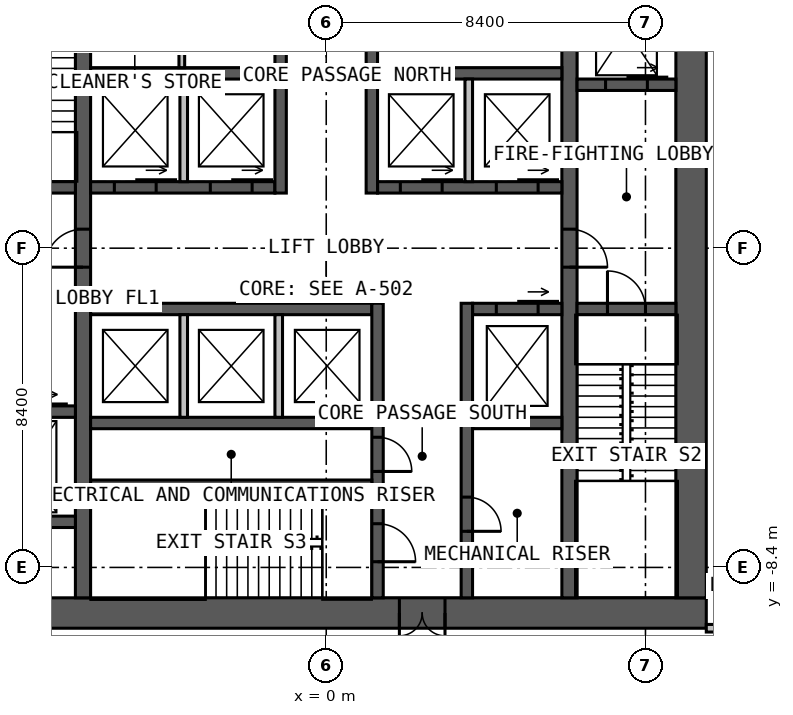
"""IFC4 building model, lengths in metres.
Left out: names, types, materials, properties, quantities, classifications, styles, units other than length and angle.
Written with IfcOpenShell. Run it as: python <this file> out.ifc"""

import sys

from ifc_helpers import new_model, si_unit, direction, frame, frame_2d, origin, place, context, subcontext, project, spatial, rectangle, extrude, element, fill, save


model = new_model("IFC4")
c1 = context("Model", 3, precision=1e-05, world=origin(), true_north=direction((0.0, 1.0)))
c2 = subcontext(c1, "Body", "Model", "MODEL_VIEW")
j1 = project(units=[si_unit("LENGTHUNIT", "METRE"), si_unit("PLANEANGLEUNIT", "RADIAN")], contexts=[c1])
p1 = place(None, origin())
s1 = spatial("IfcSite", under=j1, at=p1, CompositionType="ELEMENT")
p2 = place(p1, origin())
s2 = spatial("IfcBuilding", under=s1, at=p2, CompositionType="ELEMENT")
p3 = place(p2, frame((0.0, 0.0, 21.0)))
s3 = spatial("IfcBuildingStorey", under=s2, at=p3, CompositionType="ELEMENT", Elevation=21.0)
p4 = place(p3, frame((10.0, -9.6, 0.0), z_axis=(0.0, 0.0, 1.0), x_axis=(-1.0, 0.0, 0.0)))
e1 = element("IfcWall", 1, at=p4, inside=s3, PredefinedType="SOLIDWALL", context=c2, shape_type="SweptSolid", body=[
    extrude(rectangle(XDim=20.0, YDim=0.8, at=frame_2d((10.0, 0.0))), origin(), (0.0, 0.0, 1.0), 4.0),
])
p5 = place(p4, frame((6.875, 0.0, 0.0)))
e2 = element("IfcOpeningElement", 2, at=p5, cuts=e1, PredefinedType="OPENING", context=c2, shape_type="SweptSolid", body=[
    extrude(rectangle(XDim=1.2, YDim=2.2, at=frame_2d((0.6, 1.1))), frame((0.0, 0.41, 0.0), z_axis=(0.0, -1.0, 0.0), x_axis=(1.0, 0.0, 0.0)), (0.0, 0.0, 1.0), 0.82),
])
p6 = place(p3, frame((9.6, -9.2, 0.0), z_axis=(0.0, 0.0, 1.0), x_axis=(0.0, 1.0, 0.0)))
e3 = element("IfcWall", 3, at=p6, inside=s3, PredefinedType="SOLIDWALL", context=c2, shape_type="SweptSolid", body=[
    extrude(rectangle(XDim=18.4, YDim=0.8, at=frame_2d((9.2, 0.0))), origin(), (0.0, 0.0, 1.0), 4.0),
])
p7 = place(p3, frame((-6.4, -9.2, 0.0), z_axis=(0.0, 0.0, 1.0), x_axis=(0.0, 1.0, 0.0)))
e4 = element("IfcWall", 4, at=p7, inside=s3, PredefinedType="SOLIDWALL", context=c2, shape_type="SweptSolid", body=[
    extrude(rectangle(XDim=18.4, YDim=0.4, at=frame_2d((9.2, 0.0))), origin(), (0.0, 0.0, 1.0), 4.0),
])
p8 = place(p7, frame((8.7, 0.0, 0.0)))
e5 = element("IfcOpeningElement", 5, at=p8, cuts=e4, PredefinedType="OPENING", context=c2, shape_type="SweptSolid", body=[
    extrude(rectangle(XDim=1.0, YDim=2.2, at=frame_2d((0.5, 1.1))), frame((0.0, 0.21, 0.0), z_axis=(0.0, -1.0, 0.0), x_axis=(1.0, 0.0, 0.0)), (0.0, 0.0, 1.0), 0.42),
])
p9 = place(p3, frame((6.4, 9.2, 0.0), z_axis=(0.0, 0.0, 1.0), x_axis=(0.0, -1.0, 0.0)))
e6 = element("IfcWall", 6, at=p9, inside=s3, PredefinedType="SOLIDWALL", context=c2, shape_type="SweptSolid", body=[
    extrude(rectangle(XDim=18.4, YDim=0.4, at=frame_2d((9.2, 0.0))), origin(), (0.0, 0.0, 1.0), 4.0),
])
p10 = place(p9, frame((8.7, 0.0, 0.0)))
e7 = element("IfcOpeningElement", 7, at=p10, cuts=e6, PredefinedType="OPENING", context=c2, shape_type="SweptSolid", body=[
    extrude(rectangle(XDim=1.0, YDim=2.2, at=frame_2d((0.5, 1.1))), frame((0.0, 0.21, 0.0), z_axis=(0.0, -1.0, 0.0), x_axis=(1.0, 0.0, 0.0)), (0.0, 0.0, 1.0), 0.42),
])
p11 = place(p3, frame((-6.2, 1.6, 0.0), z_axis=(0.0, 0.0, 1.0), x_axis=(1.0, 0.0, 0.0)))
e8 = element("IfcWall", 8, at=p11, inside=s3, PredefinedType="SOLIDWALL", context=c2, shape_type="SweptSolid", body=[
    extrude(rectangle(XDim=4.85, YDim=0.3, at=frame_2d((2.425, 0.0))), origin(), (0.0, 0.0, 1.0), 4.0),
])
p12 = place(p11, frame((0.625, 0.0, 0.0)))
e9 = element("IfcOpeningElement", 9, at=p12, cuts=e8, PredefinedType="OPENING", context=c2, shape_type="SweptSolid", body=[
    extrude(rectangle(XDim=1.1, YDim=2.2, at=frame_2d((0.55, 1.1))), frame((0.0, 0.16, 0.0), z_axis=(0.0, -1.0, 0.0), x_axis=(1.0, 0.0, 0.0)), (0.0, 0.0, 1.0), 0.32),
])
p13 = place(p11, frame((3.15, 0.0, 0.0)))
e10 = element("IfcOpeningElement", 10, at=p13, cuts=e8, PredefinedType="OPENING", context=c2, shape_type="SweptSolid", body=[
    extrude(rectangle(XDim=1.1, YDim=2.2, at=frame_2d((0.55, 1.1))), frame((0.0, 0.16, 0.0), z_axis=(0.0, -1.0, 0.0), x_axis=(1.0, 0.0, 0.0)), (0.0, 0.0, 1.0), 0.32),
])
p14 = place(p3, frame((1.35, 1.6, 0.0), z_axis=(0.0, 0.0, 1.0), x_axis=(1.0, 0.0, 0.0)))
e11 = element("IfcWall", 11, at=p14, inside=s3, PredefinedType="SOLIDWALL", context=c2, shape_type="SweptSolid", body=[
    extrude(rectangle(XDim=4.85, YDim=0.3, at=frame_2d((2.425, 0.0))), origin(), (0.0, 0.0, 1.0), 4.0),
])
p15 = place(p14, frame((0.6, 0.0, 0.0)))
e12 = element("IfcOpeningElement", 12, at=p15, cuts=e11, PredefinedType="OPENING", context=c2, shape_type="SweptSolid", body=[
    extrude(rectangle(XDim=1.1, YDim=2.2, at=frame_2d((0.55, 1.1))), frame((0.0, 0.16, 0.0), z_axis=(0.0, -1.0, 0.0), x_axis=(1.0, 0.0, 0.0)), (0.0, 0.0, 1.0), 0.32),
])
p16 = place(p14, frame((3.125, 0.0, 0.0)))
e13 = element("IfcOpeningElement", 13, at=p16, cuts=e11, PredefinedType="OPENING", context=c2, shape_type="SweptSolid", body=[
    extrude(rectangle(XDim=1.1, YDim=2.2, at=frame_2d((0.55, 1.1))), frame((0.0, 0.16, 0.0), z_axis=(0.0, -1.0, 0.0), x_axis=(1.0, 0.0, 0.0)), (0.0, 0.0, 1.0), 0.32),
])
for number, where, z_axis, x_axis in (
    (14, (-6.2, 4.6, 0.0), (0.0, 0.0, 1.0), (1.0, 0.0, 0.0)),
    (15, (1.35, 4.6, 0.0), (0.0, 0.0, 1.0), (1.0, 0.0, 0.0)),
):
    element("IfcWall", number, at=place(p3, frame(where, z_axis=z_axis, x_axis=x_axis)), inside=s3, PredefinedType="SOLIDWALL", context=c2, shape_type="SweptSolid", body=[
        extrude(rectangle(XDim=4.85, YDim=0.3, at=frame_2d((2.425, 0.0))), origin(), (0.0, 0.0, 1.0), 4.0),
    ])
p17 = place(p3, frame((-1.2, 1.45, 0.0), z_axis=(0.0, 0.0, 1.0), x_axis=(0.0, 1.0, 0.0)))
e16 = element("IfcWall", 16, at=p17, inside=s3, PredefinedType="SOLIDWALL", context=c2, shape_type="SweptSolid", body=[
    extrude(rectangle(XDim=7.75, YDim=0.3, at=frame_2d((3.875, 0.0))), origin(), (0.0, 0.0, 1.0), 4.0),
])
p18 = place(p17, frame((5.05, 0.0, 0.0)))
e17 = element("IfcOpeningElement", 17, at=p18, cuts=e16, PredefinedType="OPENING", context=c2, shape_type="SweptSolid", body=[
    extrude(rectangle(XDim=1.0, YDim=2.2, at=frame_2d((0.5, 1.1))), frame((0.0, 0.16, 0.0), z_axis=(0.0, -1.0, 0.0), x_axis=(1.0, 0.0, 0.0)), (0.0, 0.0, 1.0), 0.32),
])
p19 = place(p3, frame((1.2, 1.45, 0.0), z_axis=(0.0, 0.0, 1.0), x_axis=(0.0, 1.0, 0.0)))
e18 = element("IfcWall", 18, at=p19, inside=s3, PredefinedType="SOLIDWALL", context=c2, shape_type="SweptSolid", body=[
    extrude(rectangle(XDim=7.75, YDim=0.3, at=frame_2d((3.875, 0.0))), origin(), (0.0, 0.0, 1.0), 4.0),
])
p20 = place(p19, frame((3.8, 0.0, 0.0)))
e19 = element("IfcOpeningElement", 19, at=p20, cuts=e18, PredefinedType="OPENING", context=c2, shape_type="SweptSolid", body=[
    extrude(rectangle(XDim=1.0, YDim=2.2, at=frame_2d((0.5, 1.1))), frame((0.0, 0.16, 0.0), z_axis=(0.0, -1.0, 0.0), x_axis=(1.0, 0.0, 0.0)), (0.0, 0.0, 1.0), 0.32),
])
p21 = place(p19, frame((6.15, 0.0, 0.0)))
e20 = element("IfcOpeningElement", 20, at=p21, cuts=e18, PredefinedType="OPENING", context=c2, shape_type="SweptSolid", body=[
    extrude(rectangle(XDim=1.0, YDim=2.2, at=frame_2d((0.5, 1.1))), frame((0.0, 0.16, 0.0), z_axis=(0.0, -1.0, 0.0), x_axis=(1.0, 0.0, 0.0)), (0.0, 0.0, 1.0), 0.32),
])
p22 = place(p3, frame((-6.2, -1.6, 0.0), z_axis=(0.0, 0.0, 1.0), x_axis=(1.0, 0.0, 0.0)))
e21 = element("IfcWall", 21, at=p22, inside=s3, PredefinedType="SOLIDWALL", context=c2, shape_type="SweptSolid", body=[
    extrude(rectangle(XDim=7.4, YDim=0.3, at=frame_2d((3.7, 0.0))), origin(), (0.0, 0.0, 1.0), 4.0),
])
p23 = place(p3, frame((3.85, -1.6, 0.0), z_axis=(0.0, 0.0, 1.0), x_axis=(1.0, 0.0, 0.0)))
e22 = element("IfcWall", 22, at=p23, inside=s3, PredefinedType="SOLIDWALL", context=c2, shape_type="SweptSolid", body=[
    extrude(rectangle(XDim=2.35, YDim=0.3, at=frame_2d((1.175, 0.0))), origin(), (0.0, 0.0, 1.0), 4.0),
])
p24 = place(p23, frame((0.625, 0.0, 0.0)))
e23 = element("IfcOpeningElement", 23, at=p24, cuts=e22, PredefinedType="OPENING", context=c2, shape_type="SweptSolid", body=[
    extrude(rectangle(XDim=1.1, YDim=2.2, at=frame_2d((0.55, 1.1))), frame((0.0, 0.16, 0.0), z_axis=(0.0, -1.0, 0.0), x_axis=(1.0, 0.0, 0.0)), (0.0, 0.0, 1.0), 0.32),
])
p25 = place(p3, frame((-6.2, -4.6, 0.0), z_axis=(0.0, 0.0, 1.0), x_axis=(1.0, 0.0, 0.0)))
e24 = element("IfcWall", 24, at=p25, inside=s3, PredefinedType="SOLIDWALL", context=c2, shape_type="SweptSolid", body=[
    extrude(rectangle(XDim=7.4, YDim=0.3, at=frame_2d((3.7, 0.0))), origin(), (0.0, 0.0, 1.0), 4.0),
])
p26 = place(p3, frame((3.85, -4.6, 0.0), z_axis=(0.0, 0.0, 1.0), x_axis=(1.0, 0.0, 0.0)))
e25 = element("IfcWall", 25, at=p26, inside=s3, PredefinedType="SOLIDWALL", context=c2, shape_type="SweptSolid", body=[
    extrude(rectangle(XDim=2.35, YDim=0.3, at=frame_2d((1.175, 0.0))), origin(), (0.0, 0.0, 1.0), 4.0),
])
p27 = place(p3, frame((1.35, -1.45, 0.0), z_axis=(0.0, 0.0, 1.0), x_axis=(0.0, -1.0, 0.0)))
e26 = element("IfcWall", 26, at=p27, inside=s3, PredefinedType="SOLIDWALL", context=c2, shape_type="SweptSolid", body=[
    extrude(rectangle(XDim=7.75, YDim=0.3, at=frame_2d((3.875, 0.0))), origin(), (0.0, 0.0, 1.0), 4.0),
])
p28 = place(p27, frame((5.8, 0.0, 0.0)))
e27 = element("IfcOpeningElement", 27, at=p28, cuts=e26, PredefinedType="OPENING", context=c2, shape_type="SweptSolid", body=[
    extrude(rectangle(XDim=1.0, YDim=2.2, at=frame_2d((0.5, 1.1))), frame((0.0, 0.16, 0.0), z_axis=(0.0, -1.0, 0.0), x_axis=(1.0, 0.0, 0.0)), (0.0, 0.0, 1.0), 0.32),
])
p29 = place(p27, frame((3.525, 0.0, 0.0)))
e28 = element("IfcOpeningElement", 28, at=p29, cuts=e26, PredefinedType="OPENING", context=c2, shape_type="SweptSolid", body=[
    extrude(rectangle(XDim=0.9, YDim=2.2, at=frame_2d((0.45, 1.1))), frame((0.0, 0.16, 0.0), z_axis=(0.0, -1.0, 0.0), x_axis=(1.0, 0.0, 0.0)), (0.0, 0.0, 1.0), 0.32),
])
p30 = place(p3, frame((3.7, -1.45, 0.0), z_axis=(0.0, 0.0, 1.0), x_axis=(0.0, -1.0, 0.0)))
e29 = element("IfcWall", 29, at=p30, inside=s3, PredefinedType="SOLIDWALL", context=c2, shape_type="SweptSolid", body=[
    extrude(rectangle(XDim=7.75, YDim=0.3, at=frame_2d((3.875, 0.0))), origin(), (0.0, 0.0, 1.0), 4.0),
])
p31 = place(p30, frame((5.1, 0.0, 0.0)))
e30 = element("IfcOpeningElement", 30, at=p31, cuts=e29, PredefinedType="OPENING", context=c2, shape_type="SweptSolid", body=[
    extrude(rectangle(XDim=0.9, YDim=2.2, at=frame_2d((0.45, 1.1))), frame((0.0, 0.16, 0.0), z_axis=(0.0, -1.0, 0.0), x_axis=(1.0, 0.0, 0.0)), (0.0, 0.0, 1.0), 0.32),
])
p32 = place(p3, frame((-6.2, -6.2, 0.0), z_axis=(0.0, 0.0, 1.0), x_axis=(1.0, 0.0, 0.0)))
e31 = element("IfcWall", 31, at=p32, inside=s3, PredefinedType="SOLIDWALL", context=c2, shape_type="SweptSolid", body=[
    extrude(rectangle(XDim=7.4, YDim=0.2, at=frame_2d((3.7, 0.0))), origin(), (0.0, 0.0, 1.0), 4.0),
])
p33 = place(p3, frame((-9.2, 1.6, 0.0), z_axis=(0.0, 0.0, 1.0), x_axis=(1.0, 0.0, 0.0)))
e32 = element("IfcWall", 32, at=p33, inside=s3, PredefinedType="SOLIDWALL", context=c2, shape_type="SweptSolid", body=[
    extrude(rectangle(XDim=2.6, YDim=0.3, at=frame_2d((1.3, 0.0))), origin(), (0.0, 0.0, 1.0), 4.0),
])
p34 = place(p33, frame((0.8, 0.0, 0.0)))
e33 = element("IfcOpeningElement", 33, at=p34, cuts=e32, PredefinedType="OPENING", context=c2, shape_type="SweptSolid", body=[
    extrude(rectangle(XDim=1.0, YDim=2.2, at=frame_2d((0.5, 1.1))), frame((0.0, 0.16, 0.0), z_axis=(0.0, -1.0, 0.0), x_axis=(1.0, 0.0, 0.0)), (0.0, 0.0, 1.0), 0.32),
])
p35 = place(p3, frame((6.6, -1.6, 0.0), z_axis=(0.0, 0.0, 1.0), x_axis=(1.0, 0.0, 0.0)))
e34 = element("IfcWall", 34, at=p35, inside=s3, PredefinedType="SOLIDWALL", context=c2, shape_type="SweptSolid", body=[
    extrude(rectangle(XDim=2.6, YDim=0.3, at=frame_2d((1.3, 0.0))), origin(), (0.0, 0.0, 1.0), 4.0),
])
p36 = place(p35, frame((0.8, 0.0, 0.0)))
e35 = element("IfcOpeningElement", 35, at=p36, cuts=e34, PredefinedType="OPENING", context=c2, shape_type="SweptSolid", body=[
    extrude(rectangle(XDim=1.0, YDim=2.2, at=frame_2d((0.5, 1.1))), frame((0.0, 0.16, 0.0), z_axis=(0.0, -1.0, 0.0), x_axis=(1.0, 0.0, 0.0)), (0.0, 0.0, 1.0), 0.32),
])
p37 = place(p3, frame((-9.2, -4.3, 0.0), z_axis=(0.0, 0.0, 1.0), x_axis=(1.0, 0.0, 0.0)))
e36 = element("IfcWall", 36, at=p37, inside=s3, PredefinedType="SOLIDWALL", context=c2, shape_type="SweptSolid", body=[
    extrude(rectangle(XDim=2.6, YDim=0.3, at=frame_2d((1.3, 0.0))), origin(), (0.0, 0.0, 1.0), 4.0),
])
p38 = place(p37, frame((0.75, 0.0, 0.0)))
e37 = element("IfcOpeningElement", 37, at=p38, cuts=e36, PredefinedType="OPENING", context=c2, shape_type="SweptSolid", body=[
    extrude(rectangle(XDim=1.1, YDim=2.2, at=frame_2d((0.55, 1.1))), frame((0.0, 0.16, 0.0), z_axis=(0.0, -1.0, 0.0), x_axis=(1.0, 0.0, 0.0)), (0.0, 0.0, 1.0), 0.32),
])
p39 = place(p3, frame((6.6, 4.3, 0.0), z_axis=(0.0, 0.0, 1.0), x_axis=(1.0, 0.0, 0.0)))
e38 = element("IfcWall", 38, at=p39, inside=s3, PredefinedType="SOLIDWALL", context=c2, shape_type="SweptSolid", body=[
    extrude(rectangle(XDim=2.6, YDim=0.3, at=frame_2d((1.3, 0.0))), origin(), (0.0, 0.0, 1.0), 4.0),
])
p40 = place(p39, frame((0.75, 0.0, 0.0)))
e39 = element("IfcOpeningElement", 39, at=p40, cuts=e38, PredefinedType="OPENING", context=c2, shape_type="SweptSolid", body=[
    extrude(rectangle(XDim=1.1, YDim=2.2, at=frame_2d((0.55, 1.1))), frame((0.0, 0.16, 0.0), z_axis=(0.0, -1.0, 0.0), x_axis=(1.0, 0.0, 0.0)), (0.0, 0.0, 1.0), 0.32),
])
p41 = place(p3, frame((-9.2, -7.2, 0.0), z_axis=(0.0, 0.0, 1.0), x_axis=(1.0, 0.0, 0.0)))
e40 = element("IfcWall", 40, at=p41, inside=s3, PredefinedType="SOLIDWALL", context=c2, shape_type="SweptSolid", body=[
    extrude(rectangle(XDim=2.6, YDim=0.3, at=frame_2d((1.3, 0.0))), origin(), (0.0, 0.0, 1.0), 4.0),
])
for number, where, z_axis, x_axis in (
    (41, (-3.75, 1.75, 0.0), (0.0, 0.0, 1.0), (0.0, 1.0, 0.0)),
    (42, (3.75, 1.75, 0.0), (0.0, 0.0, 1.0), (0.0, 1.0, 0.0)),
    (43, (-3.75, -1.75, 0.0), (0.0, 0.0, 1.0), (0.0, -1.0, 0.0)),
    (44, (-1.25, -1.75, 0.0), (0.0, 0.0, 1.0), (0.0, -1.0, 0.0)),
):
    element("IfcWall", number, at=place(p3, frame(where, z_axis=z_axis, x_axis=x_axis)), inside=s3, PredefinedType="SOLIDWALL", context=c2, shape_type="SweptSolid", body=[
        extrude(rectangle(XDim=2.7, YDim=0.2, at=frame_2d((1.35, 0.0))), origin(), (0.0, 0.0, 1.0), 3.75),
    ])
p42 = place(p3, frame((-3.8, 4.75, 0.0), z_axis=(0.0, 0.0, 1.0), x_axis=(0.0, 1.0, 0.0)))
e45 = element("IfcWall", 45, at=p42, inside=s3, PredefinedType="PARTITIONING", context=c2, shape_type="SweptSolid", body=[
    extrude(rectangle(XDim=1.375, YDim=0.15, at=frame_2d((0.688, 0.0))), origin(), (0.0, 0.0, 1.0), 3.75),
])
p43 = place(p3, frame((10.0, -10.0, 0.0), z_axis=(0.0, 0.0, 1.0), x_axis=(1.0, 0.0, 0.0)))
e46 = element("IfcWall", 46, at=p43, inside=s3, PredefinedType="PARTITIONING", context=c2, shape_type="SweptSolid", body=[
    extrude(rectangle(XDim=2.0, YDim=0.2, at=frame_2d((1.0, 0.0))), origin(), (0.0, 0.0, 1.0), 3.8),
])
p44 = place(p43, frame((0.5, 0.0, 0.0)))
e47 = element("IfcOpeningElement", 47, at=p44, cuts=e46, PredefinedType="OPENING", context=c2, shape_type="SweptSolid", body=[
    extrude(rectangle(XDim=1.0, YDim=2.2, at=frame_2d((0.5, 1.1))), frame((0.0, 0.11, 0.0), z_axis=(0.0, -1.0, 0.0), x_axis=(1.0, 0.0, 0.0)), (0.0, 0.0, 1.0), 0.22),
])
p45 = place(p5, origin())
e48 = element("IfcDoor", 48, at=p45, inside=s3, OperationType="DOUBLE_DOOR_SINGLE_SWING", PredefinedType="DOOR", context=c2, shape_type="SweptSolid", body=[
    extrude(rectangle(XDim=1.2, YDim=2.2, at=frame_2d((0.6, 1.1))), frame((0.0, 0.025, 0.0), z_axis=(0.0, -1.0, 0.0), x_axis=(1.0, 0.0, 0.0)), (0.0, 0.0, 1.0), 0.05),
])
fill(e2, e48)
p46 = place(p8, origin())
e49 = element("IfcDoor", 49, at=p46, inside=s3, OperationType="SINGLE_SWING_LEFT", PredefinedType="DOOR", context=c2, shape_type="SweptSolid", body=[
    extrude(rectangle(XDim=1.0, YDim=2.2, at=frame_2d((0.5, 1.1))), frame((0.0, 0.025, 0.0), z_axis=(0.0, -1.0, 0.0), x_axis=(1.0, 0.0, 0.0)), (0.0, 0.0, 1.0), 0.05),
])
fill(e5, e49)
p47 = place(p10, origin())
e50 = element("IfcDoor", 50, at=p47, inside=s3, OperationType="SINGLE_SWING_RIGHT", PredefinedType="DOOR", context=c2, shape_type="SweptSolid", body=[
    extrude(rectangle(XDim=1.0, YDim=2.2, at=frame_2d((0.5, 1.1))), frame((0.0, 0.025, 0.0), z_axis=(0.0, -1.0, 0.0), x_axis=(1.0, 0.0, 0.0)), (0.0, 0.0, 1.0), 0.05),
])
fill(e7, e50)
p48 = place(p36, origin())
e51 = element("IfcDoor", 51, at=p48, inside=s3, OperationType="SINGLE_SWING_LEFT", PredefinedType="DOOR", context=c2, shape_type="SweptSolid", body=[
    extrude(rectangle(XDim=1.0, YDim=2.2, at=frame_2d((0.5, 1.1))), frame((0.0, 0.025, 0.0), z_axis=(0.0, -1.0, 0.0), x_axis=(1.0, 0.0, 0.0)), (0.0, 0.0, 1.0), 0.05),
])
fill(e35, e51)
p49 = place(p28, origin())
e52 = element("IfcDoor", 52, at=p49, inside=s3, OperationType="SINGLE_SWING_RIGHT", PredefinedType="DOOR", context=c2, shape_type="SweptSolid", body=[
    extrude(rectangle(XDim=1.0, YDim=2.2, at=frame_2d((0.5, 1.1))), frame((0.0, 0.025, 0.0), z_axis=(0.0, -1.0, 0.0), x_axis=(1.0, 0.0, 0.0)), (0.0, 0.0, 1.0), 0.05),
])
fill(e27, e52)
p50 = place(p29, origin())
e53 = element("IfcDoor", 53, at=p50, inside=s3, OperationType="SINGLE_SWING_RIGHT", PredefinedType="DOOR", context=c2, shape_type="SweptSolid", body=[
    extrude(rectangle(XDim=0.9, YDim=2.2, at=frame_2d((0.45, 1.1))), frame((0.0, 0.025, 0.0), z_axis=(0.0, -1.0, 0.0), x_axis=(1.0, 0.0, 0.0)), (0.0, 0.0, 1.0), 0.05),
])
fill(e28, e53)
p51 = place(p31, origin())
e54 = element("IfcDoor", 54, at=p51, inside=s3, OperationType="SINGLE_SWING_RIGHT", PredefinedType="DOOR", context=c2, shape_type="SweptSolid", body=[
    extrude(rectangle(XDim=0.9, YDim=2.2, at=frame_2d((0.45, 1.1))), frame((0.0, 0.025, 0.0), z_axis=(0.0, -1.0, 0.0), x_axis=(1.0, 0.0, 0.0)), (0.0, 0.0, 1.0), 0.05),
])
fill(e30, e54)
p52 = place(p12, origin())
e55 = element("IfcDoor", 55, at=p52, inside=s3, OperationType="SLIDING_TO_LEFT", PredefinedType="DOOR", context=c2, shape_type="SweptSolid", body=[
    extrude(rectangle(XDim=1.1, YDim=2.2, at=frame_2d((0.55, 1.1))), frame((0.0, 0.025, 0.0), z_axis=(0.0, -1.0, 0.0), x_axis=(1.0, 0.0, 0.0)), (0.0, 0.0, 1.0), 0.05),
])
fill(e9, e55)
p53 = place(p13, origin())
e56 = element("IfcDoor", 56, at=p53, inside=s3, OperationType="SLIDING_TO_LEFT", PredefinedType="DOOR", context=c2, shape_type="SweptSolid", body=[
    extrude(rectangle(XDim=1.1, YDim=2.2, at=frame_2d((0.55, 1.1))), frame((0.0, 0.025, 0.0), z_axis=(0.0, -1.0, 0.0), x_axis=(1.0, 0.0, 0.0)), (0.0, 0.0, 1.0), 0.05),
])
fill(e10, e56)
p54 = place(p15, origin())
e57 = element("IfcDoor", 57, at=p54, inside=s3, OperationType="SLIDING_TO_LEFT", PredefinedType="DOOR", context=c2, shape_type="SweptSolid", body=[
    extrude(rectangle(XDim=1.1, YDim=2.2, at=frame_2d((0.55, 1.1))), frame((0.0, 0.025, 0.0), z_axis=(0.0, -1.0, 0.0), x_axis=(1.0, 0.0, 0.0)), (0.0, 0.0, 1.0), 0.05),
])
fill(e12, e57)
p55 = place(p16, origin())
e58 = element("IfcDoor", 58, at=p55, inside=s3, OperationType="SLIDING_TO_LEFT", PredefinedType="DOOR", context=c2, shape_type="SweptSolid", body=[
    extrude(rectangle(XDim=1.1, YDim=2.2, at=frame_2d((0.55, 1.1))), frame((0.0, 0.025, 0.0), z_axis=(0.0, -1.0, 0.0), x_axis=(1.0, 0.0, 0.0)), (0.0, 0.0, 1.0), 0.05),
])
fill(e13, e58)
p56 = place(p24, origin())
e59 = element("IfcDoor", 59, at=p56, inside=s3, OperationType="SLIDING_TO_LEFT", PredefinedType="DOOR", context=c2, shape_type="SweptSolid", body=[
    extrude(rectangle(XDim=1.1, YDim=2.2, at=frame_2d((0.55, 1.1))), frame((0.0, 0.025, 0.0), z_axis=(0.0, -1.0, 0.0), x_axis=(1.0, 0.0, 0.0)), (0.0, 0.0, 1.0), 0.05),
])
fill(e23, e59)
p57 = place(p40, origin())
e60 = element("IfcDoor", 60, at=p57, inside=s3, OperationType="SLIDING_TO_LEFT", PredefinedType="DOOR", context=c2, shape_type="SweptSolid", body=[
    extrude(rectangle(XDim=1.1, YDim=2.2, at=frame_2d((0.55, 1.1))), frame((0.0, 0.025, 0.0), z_axis=(0.0, -1.0, 0.0), x_axis=(1.0, 0.0, 0.0)), (0.0, 0.0, 1.0), 0.05),
])
fill(e39, e60)
save(model, sys.argv[1])
